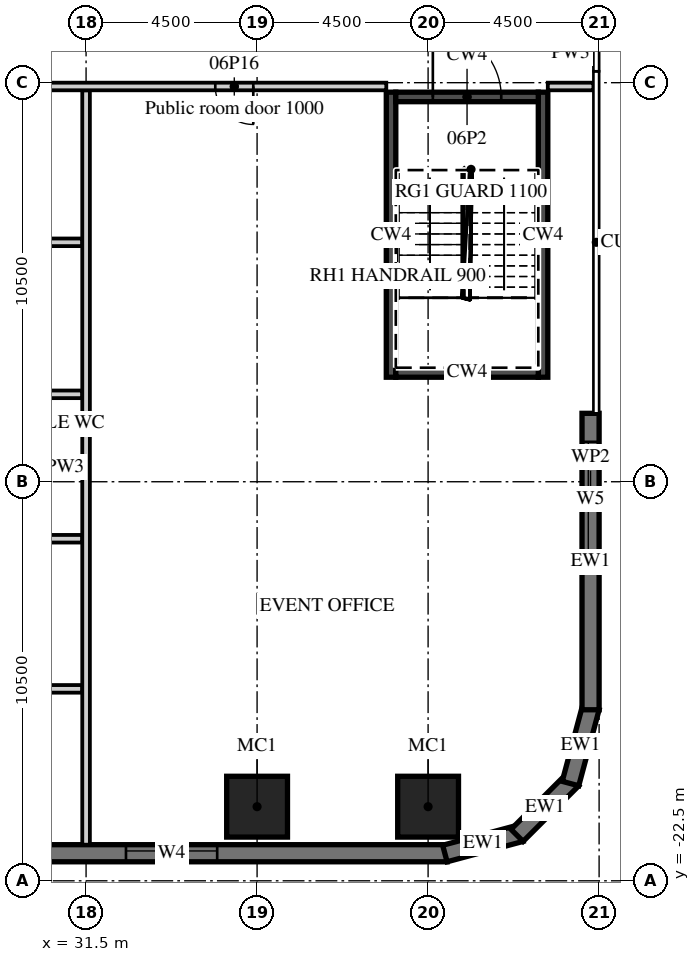
"""IFC4 building model, lengths in metres.
Left out: names, types, materials, properties, quantities, classifications, styles, units other than length and angle.
Written with IfcOpenShell. Run it as: python <this file> out.ifc"""

import sys

from ifc_helpers import new_model, si_unit, direction, frame, frame_2d, origin, origin_2d, place, context, subcontext, project, spatial, polyline, rectangle, outline, extrude, element, fill, save


model = new_model("IFC4")
c1 = context("Model", 3, precision=1e-05, world=origin(), true_north=direction((0.0, 1.0)))
c2 = subcontext(c1, "Body", "Model", "MODEL_VIEW")
j1 = project(units=[si_unit("LENGTHUNIT", "METRE"), si_unit("PLANEANGLEUNIT", "RADIAN")], contexts=[c1])
p1 = place(None, origin())
s1 = spatial("IfcSite", under=j1, at=p1, CompositionType="ELEMENT")
p2 = place(p1, origin())
s2 = spatial("IfcBuilding", under=s1, at=p2, CompositionType="ELEMENT")
p3 = place(p2, frame((0.0, 0.0, 38.0)))
s3 = spatial("IfcBuildingStorey", under=s2, at=p3, CompositionType="ELEMENT", Elevation=38.0)
for number, where, z_axis, x_axis in (
    (1, (36.0, -20.55, 0.0), (0.0, 0.0, 1.0), (1.0, 0.0, 0.0)),
    (2, (40.5, -20.55, 0.0), (0.0, 0.0, 1.0), (1.0, 0.0, 0.0)),
):
    element("IfcColumn", number, at=place(p3, frame(where, z_axis=z_axis, x_axis=x_axis)), inside=s3, PredefinedType="COLUMN", context=c2, shape_type="SweptSolid", body=[
        extrude(rectangle(XDim=1.6, YDim=1.6, at=origin_2d()), origin(), (0.0, 0.0, 1.0), 8.7),
    ])
p4 = place(p3, frame((-13.5, -21.775, 0.0), z_axis=(0.0, 0.0, 1.0), x_axis=(1.0, 0.0, 0.0)))
e3 = element("IfcWall", 3, at=p4, inside=s3, PredefinedType="SOLIDWALL", context=c2, shape_type="SweptSolid", body=[
    extrude(rectangle(XDim=54.5, YDim=0.45, at=frame_2d((27.25, 0.0))), origin(), (0.0, 0.0, 1.0), 8.7),
])
p5 = place(p4, frame((1.05, 0.0, 0.9)))
e4 = element("IfcOpeningElement", 4, at=p5, cuts=e3, PredefinedType="OPENING", context=c2, shape_type="SweptSolid", body=[
    extrude(rectangle(XDim=2.4, YDim=1.8, at=frame_2d((1.2, 0.9))), frame((0.0, 0.235, 0.0), z_axis=(0.0, -1.0, 0.0), x_axis=(1.0, 0.0, 0.0)), (0.0, 0.0, 1.0), 0.47),
])
p6 = place(p4, frame((5.55, 0.0, 0.9)))
e5 = element("IfcOpeningElement", 5, at=p6, cuts=e3, PredefinedType="OPENING", context=c2, shape_type="SweptSolid", body=[
    extrude(rectangle(XDim=2.4, YDim=1.8, at=frame_2d((1.2, 0.9))), frame((0.0, 0.235, 0.0), z_axis=(0.0, -1.0, 0.0), x_axis=(1.0, 0.0, 0.0)), (0.0, 0.0, 1.0), 0.47),
])
p7 = place(p4, frame((10.05, 0.0, 0.9)))
e6 = element("IfcOpeningElement", 6, at=p7, cuts=e3, PredefinedType="OPENING", context=c2, shape_type="SweptSolid", body=[
    extrude(rectangle(XDim=2.4, YDim=1.8, at=frame_2d((1.2, 0.9))), frame((0.0, 0.235, 0.0), z_axis=(0.0, -1.0, 0.0), x_axis=(1.0, 0.0, 0.0)), (0.0, 0.0, 1.0), 0.47),
])
p8 = place(p4, frame((14.55, 0.0, 0.9)))
e7 = element("IfcOpeningElement", 7, at=p8, cuts=e3, PredefinedType="OPENING", context=c2, shape_type="SweptSolid", body=[
    extrude(rectangle(XDim=2.4, YDim=1.8, at=frame_2d((1.2, 0.9))), frame((0.0, 0.235, 0.0), z_axis=(0.0, -1.0, 0.0), x_axis=(1.0, 0.0, 0.0)), (0.0, 0.0, 1.0), 0.47),
])
p9 = place(p4, frame((19.05, 0.0, 0.9)))
e8 = element("IfcOpeningElement", 8, at=p9, cuts=e3, PredefinedType="OPENING", context=c2, shape_type="SweptSolid", body=[
    extrude(rectangle(XDim=2.4, YDim=1.8, at=frame_2d((1.2, 0.9))), frame((0.0, 0.235, 0.0), z_axis=(0.0, -1.0, 0.0), x_axis=(1.0, 0.0, 0.0)), (0.0, 0.0, 1.0), 0.47),
])
p10 = place(p4, frame((23.55, 0.0, 0.9)))
e9 = element("IfcOpeningElement", 9, at=p10, cuts=e3, PredefinedType="OPENING", context=c2, shape_type="SweptSolid", body=[
    extrude(rectangle(XDim=2.4, YDim=1.8, at=frame_2d((1.2, 0.9))), frame((0.0, 0.235, 0.0), z_axis=(0.0, -1.0, 0.0), x_axis=(1.0, 0.0, 0.0)), (0.0, 0.0, 1.0), 0.47),
])
p11 = place(p4, frame((28.05, 0.0, 0.9)))
e10 = element("IfcOpeningElement", 10, at=p11, cuts=e3, PredefinedType="OPENING", context=c2, shape_type="SweptSolid", body=[
    extrude(rectangle(XDim=2.4, YDim=1.8, at=frame_2d((1.2, 0.9))), frame((0.0, 0.235, 0.0), z_axis=(0.0, -1.0, 0.0), x_axis=(1.0, 0.0, 0.0)), (0.0, 0.0, 1.0), 0.47),
])
p12 = place(p4, frame((32.55, 0.0, 0.9)))
e11 = element("IfcOpeningElement", 11, at=p12, cuts=e3, PredefinedType="OPENING", context=c2, shape_type="SweptSolid", body=[
    extrude(rectangle(XDim=2.4, YDim=1.8, at=frame_2d((1.2, 0.9))), frame((0.0, 0.235, 0.0), z_axis=(0.0, -1.0, 0.0), x_axis=(1.0, 0.0, 0.0)), (0.0, 0.0, 1.0), 0.47),
])
p13 = place(p4, frame((37.05, 0.0, 0.9)))
e12 = element("IfcOpeningElement", 12, at=p13, cuts=e3, PredefinedType="OPENING", context=c2, shape_type="SweptSolid", body=[
    extrude(rectangle(XDim=2.4, YDim=1.8, at=frame_2d((1.2, 0.9))), frame((0.0, 0.235, 0.0), z_axis=(0.0, -1.0, 0.0), x_axis=(1.0, 0.0, 0.0)), (0.0, 0.0, 1.0), 0.47),
])
p14 = place(p4, frame((41.55, 0.0, 0.9)))
e13 = element("IfcOpeningElement", 13, at=p14, cuts=e3, PredefinedType="OPENING", context=c2, shape_type="SweptSolid", body=[
    extrude(rectangle(XDim=2.4, YDim=1.8, at=frame_2d((1.2, 0.9))), frame((0.0, 0.235, 0.0), z_axis=(0.0, -1.0, 0.0), x_axis=(1.0, 0.0, 0.0)), (0.0, 0.0, 1.0), 0.47),
])
p15 = place(p4, frame((46.05, 0.0, 0.9)))
e14 = element("IfcOpeningElement", 14, at=p15, cuts=e3, PredefinedType="OPENING", context=c2, shape_type="SweptSolid", body=[
    extrude(rectangle(XDim=2.4, YDim=1.8, at=frame_2d((1.2, 0.9))), frame((0.0, 0.235, 0.0), z_axis=(0.0, -1.0, 0.0), x_axis=(1.0, 0.0, 0.0)), (0.0, 0.0, 1.0), 0.47),
])
p16 = place(p3, frame((40.942, -21.783, 0.0), z_axis=(0.0, 0.0, 1.0), x_axis=(0.965926999034, 0.25881466832, 0.0)))
e15 = element("IfcWall", 15, at=p16, inside=s3, PredefinedType="SOLIDWALL", context=c2, shape_type="SweptSolid", body=[
    extrude(outline(polyline([(0.0, -0.225), (2.071, -0.225), (1.95, 0.225), (0.121, 0.225), (0.0, -0.225)])), origin(), (0.0, 0.0, 1.0), 8.7),
])
p17 = place(p3, frame((42.841, -21.305, 0.0), z_axis=(0.0, 0.0, 1.0), x_axis=(0.707106781187, 0.707106781187, 0.0)))
e16 = element("IfcWall", 16, at=p17, inside=s3, PredefinedType="SOLIDWALL", context=c2, shape_type="SweptSolid", body=[
    extrude(outline(polyline([(0.0, -0.225), (2.071, -0.225), (1.95, 0.225), (0.121, 0.225), (0.0, -0.225)])), origin(), (0.0, 0.0, 1.0), 8.7),
])
p18 = place(p3, frame((44.247, -19.942, 0.0), z_axis=(0.0, 0.0, 1.0), x_axis=(0.25881466832, 0.965926999034, 0.0)))
e17 = element("IfcWall", 17, at=p18, inside=s3, PredefinedType="SOLIDWALL", context=c2, shape_type="SweptSolid", body=[
    extrude(outline(polyline([(-0.0, -0.225), (2.07, -0.225), (1.95, 0.225), (0.12, 0.225), (-0.0, -0.225)])), origin(), (0.0, 0.0, 1.0), 8.7),
])
p19 = place(p3, frame((44.775, -18.0, 0.0), z_axis=(0.0, 0.0, 1.0), x_axis=(0.0, 1.0, 0.0)))
e18 = element("IfcWall", 18, at=p19, inside=s3, PredefinedType="SOLIDWALL", context=c2, shape_type="SweptSolid", body=[
    extrude(rectangle(XDim=7.8, YDim=0.45, at=frame_2d((3.9, 0.0))), origin(), (0.0, 0.0, 1.0), 8.7),
])
p20 = place(p19, frame((4.05, 0.0, 0.9)))
e19 = element("IfcOpeningElement", 19, at=p20, cuts=e18, PredefinedType="OPENING", context=c2, shape_type="SweptSolid", body=[
    extrude(rectangle(XDim=3.0, YDim=1.8, at=frame_2d((1.5, 0.9))), frame((0.0, 0.235, 0.0), z_axis=(0.0, -1.0, 0.0), x_axis=(1.0, 0.0, 0.0)), (0.0, 0.0, 1.0), 0.47),
])
for number, where, z_axis, x_axis in (
    (20, (39.525, -9.25, 0.0), (0.0, 0.0, 1.0), (0.0, 1.0, 0.0)),
    (21, (43.525, -9.25, 0.0), (0.0, 0.0, 1.0), (0.0, 1.0, 0.0)),
):
    element("IfcWall", number, at=place(p3, frame(where, z_axis=z_axis, x_axis=x_axis)), inside=s3, PredefinedType="SHEAR", context=c2, shape_type="SweptSolid", body=[
        extrude(rectangle(XDim=7.5, YDim=0.25, at=frame_2d((3.75, 0.0))), origin(), (0.0, 0.0, 1.0), 8.7),
    ])
p21 = place(p3, frame((39.65, -9.125, 0.0), z_axis=(0.0, 0.0, 1.0), x_axis=(1.0, 0.0, 0.0)))
e22 = element("IfcWall", 22, at=p21, inside=s3, PredefinedType="SHEAR", context=c2, shape_type="SweptSolid", body=[
    extrude(rectangle(XDim=3.75, YDim=0.25, at=frame_2d((1.875, 0.0))), origin(), (0.0, 0.0, 1.0), 8.7),
])
p22 = place(p3, frame((39.65, -1.875, 0.0), z_axis=(0.0, 0.0, 1.0), x_axis=(1.0, 0.0, 0.0)))
e23 = element("IfcWall", 23, at=p22, inside=s3, PredefinedType="SHEAR", context=c2, shape_type="SweptSolid", body=[
    extrude(rectangle(XDim=3.75, YDim=0.25, at=frame_2d((1.875, 0.0))), origin(), (0.0, 0.0, 1.0), 8.7),
])
p23 = place(p22, frame((0.975, 0.0, 0.0)))
e24 = element("IfcOpeningElement", 24, at=p23, cuts=e23, PredefinedType="OPENING", context=c2, shape_type="SweptSolid", body=[
    extrude(rectangle(XDim=1.8, YDim=2.1, at=frame_2d((0.9, 1.05))), frame((0.0, 0.135, 0.0), z_axis=(0.0, -1.0, 0.0), x_axis=(1.0, 0.0, 0.0)), (0.0, 0.0, 1.0), 0.27),
])
for number, where, z_axis, x_axis in (
    (25, (26.35, -5.7, 0.0), (0.0, 0.0, 1.0), (1.0, 0.0, 0.0)),
    (26, (26.35, -9.7, 0.0), (0.0, 0.0, 1.0), (1.0, 0.0, 0.0)),
    (27, (26.35, -13.5, 0.0), (0.0, 0.0, 1.0), (1.0, 0.0, 0.0)),
):
    element("IfcWall", number, at=place(p3, frame(where, z_axis=z_axis, x_axis=x_axis)), inside=s3, PredefinedType="PARTITIONING", context=c2, shape_type="SweptSolid", body=[
        extrude(rectangle(XDim=5.05, YDim=0.2, at=frame_2d((2.525, 0.0))), origin(), (0.0, 0.0, 1.0), 8.7),
    ])
p24 = place(p3, frame((22.6, -17.45, 0.0), z_axis=(0.0, 0.0, 1.0), x_axis=(1.0, 0.0, 0.0)))
e28 = element("IfcWall", 28, at=p24, inside=s3, PredefinedType="PARTITIONING", context=c2, shape_type="SweptSolid", body=[
    extrude(rectangle(XDim=8.8, YDim=0.2, at=frame_2d((4.4, 0.0))), origin(), (0.0, 0.0, 1.0), 8.7),
])
p25 = place(p24, frame((2.4, 0.0, 0.0)))
e29 = element("IfcOpeningElement", 29, at=p25, cuts=e28, PredefinedType="OPENING", context=c2, shape_type="SweptSolid", body=[
    extrude(rectangle(XDim=0.9, YDim=2.1, at=frame_2d((0.45, 1.05))), frame((0.0, 0.11, 0.0), z_axis=(0.0, -1.0, 0.0), x_axis=(1.0, 0.0, 0.0)), (0.0, 0.0, 1.0), 0.22),
])
p26 = place(p3, frame((31.5, -21.55, 0.0), z_axis=(0.0, 0.0, 1.0), x_axis=(0.0, 1.0, 0.0)))
e30 = element("IfcWall", 30, at=p26, inside=s3, PredefinedType="PARTITIONING", context=c2, shape_type="SweptSolid", body=[
    extrude(rectangle(XDim=19.85, YDim=0.2, at=frame_2d((9.925, 0.0))), origin(), (0.0, 0.0, 1.0), 8.7),
])
p27 = place(p3, frame((13.5, -1.6, 0.0), z_axis=(0.0, 0.0, 1.0), x_axis=(1.0, 0.0, 0.0)))
e31 = element("IfcWall", 31, at=p27, inside=s3, PredefinedType="PARTITIONING", context=c2, shape_type="SweptSolid", body=[
    extrude(rectangle(XDim=25.9, YDim=0.2, at=frame_2d((12.95, 0.0))), origin(), (0.0, 0.0, 1.0), 8.7),
])
p28 = place(p27, frame((3.55, 0.0, 0.0)))
e32 = element("IfcOpeningElement", 32, at=p28, cuts=e31, PredefinedType="OPENING", context=c2, shape_type="SweptSolid", body=[
    extrude(rectangle(XDim=1.8, YDim=2.1, at=frame_2d((0.9, 1.05))), frame((0.0, 0.11, 0.0), z_axis=(0.0, -1.0, 0.0), x_axis=(1.0, 0.0, 0.0)), (0.0, 0.0, 1.0), 0.22),
])
p29 = place(p27, frame((10.325, 0.0, 0.0)))
e33 = element("IfcOpeningElement", 33, at=p29, cuts=e31, PredefinedType="OPENING", context=c2, shape_type="SweptSolid", body=[
    extrude(rectangle(XDim=1.2, YDim=2.1, at=frame_2d((0.6, 1.05))), frame((0.0, 0.11, 0.0), z_axis=(0.0, -1.0, 0.0), x_axis=(1.0, 0.0, 0.0)), (0.0, 0.0, 1.0), 0.22),
])
p30 = place(p27, frame((21.4, 0.0, 0.0)))
e34 = element("IfcOpeningElement", 34, at=p30, cuts=e31, PredefinedType="OPENING", context=c2, shape_type="SweptSolid", body=[
    extrude(rectangle(XDim=1.0, YDim=2.1, at=frame_2d((0.5, 1.05))), frame((0.0, 0.11, 0.0), z_axis=(0.0, -1.0, 0.0), x_axis=(1.0, 0.0, 0.0)), (0.0, 0.0, 1.0), 0.22),
])
p31 = place(p3, frame((43.65, -1.6, 0.0), z_axis=(0.0, 0.0, 1.0), x_axis=(1.0, 0.0, 0.0)))
e35 = element("IfcWall", 35, at=p31, inside=s3, PredefinedType="PARTITIONING", context=c2, shape_type="SweptSolid", body=[
    extrude(rectangle(XDim=1.2, YDim=0.2, at=frame_2d((0.6, 0.0))), origin(), (0.0, 0.0, 1.0), 8.7),
])
p32 = place(p15, origin())
e36 = element("IfcWindow", 36, at=p32, inside=s3, PartitioningType="SINGLE_PANEL", PredefinedType="WINDOW", context=c2, shape_type="SweptSolid", body=[
    extrude(rectangle(XDim=2.4, YDim=1.8, at=frame_2d((1.2, 0.9))), frame((0.0, 0.09, 0.0), z_axis=(0.0, -1.0, 0.0), x_axis=(1.0, 0.0, 0.0)), (0.0, 0.0, 1.0), 0.06),
])
fill(e14, e36)
p33 = place(p20, origin())
e37 = element("IfcWindow", 37, at=p33, inside=s3, PartitioningType="SINGLE_PANEL", PredefinedType="WINDOW", context=c2, shape_type="SweptSolid", body=[
    extrude(rectangle(XDim=3.0, YDim=1.8, at=frame_2d((1.5, 0.9))), frame((0.0, 0.09, 0.0), z_axis=(0.0, -1.0, 0.0), x_axis=(1.0, 0.0, 0.0)), (0.0, 0.0, 1.0), 0.06),
])
fill(e19, e37)
p34 = place(p23, origin())
e38 = element("IfcDoor", 38, at=p34, inside=s3, OperationType="DOUBLE_DOOR_DOUBLE_SWING", PredefinedType="DOOR", context=c2, shape_type="SweptSolid", body=[
    extrude(rectangle(XDim=1.8, YDim=2.1, at=frame_2d((0.9, 1.05))), frame((0.0, 0.025, 0.0), z_axis=(0.0, -1.0, 0.0), x_axis=(1.0, 0.0, 0.0)), (0.0, 0.0, 1.0), 0.05),
])
fill(e24, e38)
p35 = place(p30, origin())
e39 = element("IfcDoor", 39, at=p35, inside=s3, OperationType="SINGLE_SWING_RIGHT", PredefinedType="DOOR", context=c2, shape_type="SweptSolid", body=[
    extrude(rectangle(XDim=1.0, YDim=2.1, at=frame_2d((0.5, 1.05))), frame((0.0, 0.025, 0.0), z_axis=(0.0, -1.0, 0.0), x_axis=(1.0, 0.0, 0.0)), (0.0, 0.0, 1.0), 0.05),
])
fill(e34, e39)
save(model, sys.argv[1])
